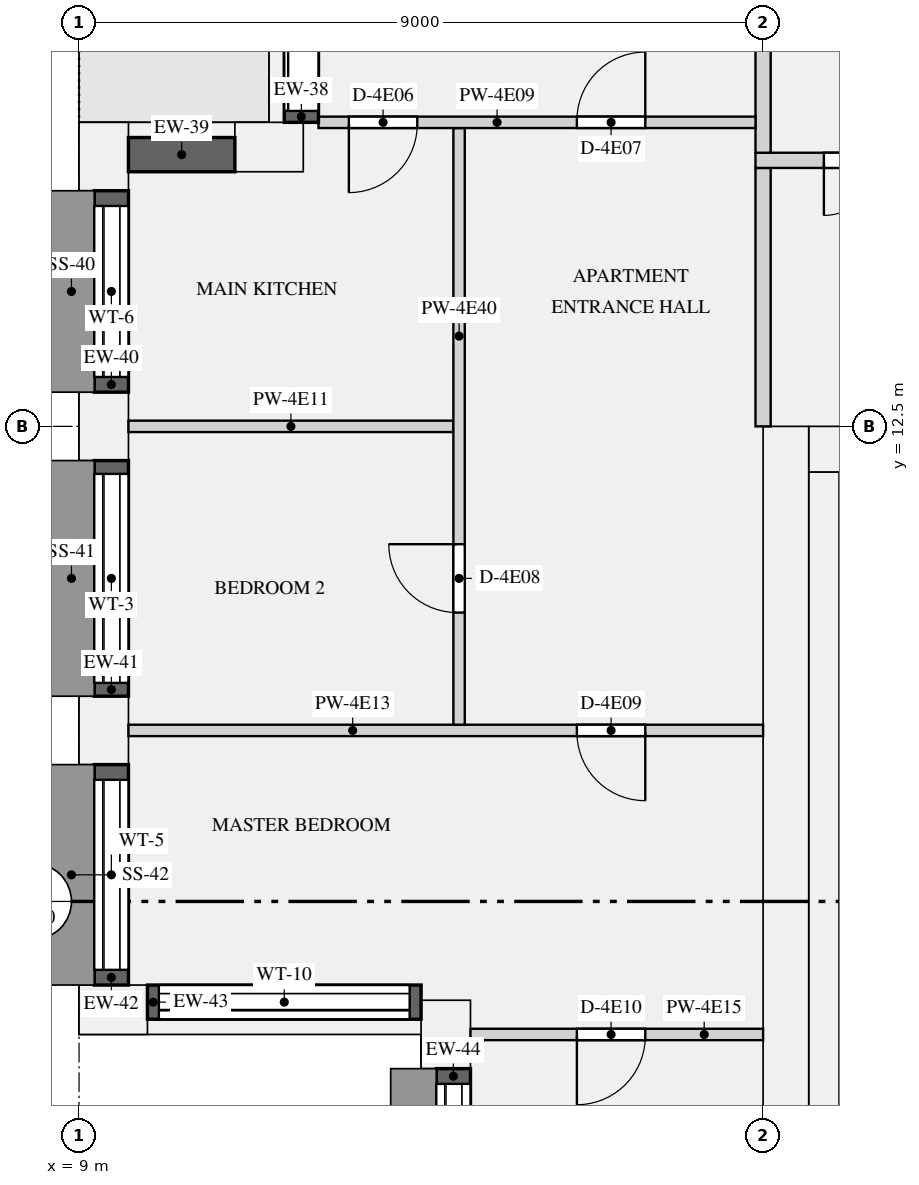
"""IFC4 building model, lengths in metres.
Left out: names, types, materials, properties, quantities, classifications, styles, units other than length and angle.
Written with IfcOpenShell. Run it as: python <this file> out.ifc"""

import sys

from ifc_helpers import new_model, si_unit, direction, frame, frame_2d, origin, origin_2d, place, context, subcontext, project, spatial, rectangle, extrude, element, fill, save


model = new_model("IFC4")
c1 = context("Model", 3, precision=1e-05, world=origin(), true_north=direction((0.0, 1.0)))
c2 = subcontext(c1, "Body", "Model", "MODEL_VIEW")
j1 = project(units=[si_unit("LENGTHUNIT", "METRE"), si_unit("PLANEANGLEUNIT", "RADIAN")], contexts=[c1])
p1 = place(None, origin())
s1 = spatial("IfcSite", under=j1, at=p1, CompositionType="ELEMENT")
p2 = place(p1, origin())
s2 = spatial("IfcBuilding", under=s1, at=p2, CompositionType="ELEMENT")
p3 = place(p2, frame((0.0, 0.0, 232.65)))
s3 = spatial("IfcBuildingStorey", under=s2, at=p3, CompositionType="ELEMENT", Elevation=232.65)
for number, where, z_axis, x_axis in (
    (1, (11.5, 16.175, 0.0), (0.0, 0.0, 1.0), (-1.0, 0.0, 0.0)),
    (2, (9.325, 16.05, 0.0), (0.0, 0.0, 1.0), (0.0, -1.0, 0.0)),
    (3, (9.325, 12.5, 0.0), (0.0, 0.0, 1.0), (0.0, -1.0, 0.0)),
    (4, (9.325, 8.5, 0.0), (0.0, 0.0, 1.0), (0.0, -1.0, 0.0)),
    (5, (9.45, 4.825, 0.0), (0.0, 0.0, 1.0), (1.0, 0.0, 0.0)),
    (6, (13.825, 4.5, 0.0), (0.0, 0.0, 1.0), (0.0, -1.0, 0.0)),
):
    element("IfcColumn", number, at=place(p3, frame(where, z_axis=z_axis, x_axis=x_axis)), inside=s3, PredefinedType="USERDEFINED", context=c2, shape_type="SweptSolid", body=[
        extrude(rectangle(XDim=0.9, YDim=0.65, at=origin_2d()), origin(), (0.0, 0.0, 1.0), 3.15),
    ])
p4 = place(p3, frame((18.3, 0.0, 0.0), z_axis=(0.0, 0.0, 1.0), x_axis=(0.0, 1.0, 0.0)))
e7 = element("IfcWall", 7, at=p4, inside=s3, PredefinedType="SHEAR", context=c2, shape_type="SweptSolid", body=[
    extrude(rectangle(XDim=12.5, YDim=0.6, at=frame_2d((6.25, 0.0))), origin(), (0.0, 0.0, 1.0), 3.15),
])
p5 = place(p3, frame((18.6, 12.2, 0.0), z_axis=(0.0, 0.0, 1.0), x_axis=(1.0, 0.0, 0.0)))
e8 = element("IfcWall", 8, at=p5, inside=s3, PredefinedType="SHEAR", context=c2, shape_type="SweptSolid", body=[
    extrude(rectangle(XDim=34.8, YDim=0.6, at=frame_2d((17.4, 0.0))), origin(), (0.0, 0.0, 1.0), 3.15),
])
p6 = place(p5, frame((24.575, 0.0, 0.0)))
e9 = element("IfcOpeningElement", 9, at=p6, cuts=e8, PredefinedType="OPENING", context=c2, shape_type="SweptSolid", body=[
    extrude(rectangle(XDim=1.1, YDim=2.1, at=frame_2d((0.55, 1.05))), frame((0.0, 0.31, 0.0), z_axis=(0.0, -1.0, 0.0), x_axis=(1.0, 0.0, 0.0)), (0.0, 0.0, 1.0), 0.62),
])
p7 = place(p5, frame((26.825, 0.0, 0.0)))
e10 = element("IfcOpeningElement", 10, at=p7, cuts=e8, PredefinedType="OPENING", context=c2, shape_type="SweptSolid", body=[
    extrude(rectangle(XDim=1.1, YDim=2.1, at=frame_2d((0.55, 1.05))), frame((0.0, 0.31, 0.0), z_axis=(0.0, -1.0, 0.0), x_axis=(1.0, 0.0, 0.0)), (0.0, 0.0, 1.0), 0.62),
])
p8 = place(p5, frame((29.075, 0.0, 0.0)))
e11 = element("IfcOpeningElement", 11, at=p8, cuts=e8, PredefinedType="OPENING", context=c2, shape_type="SweptSolid", body=[
    extrude(rectangle(XDim=1.1, YDim=2.1, at=frame_2d((0.55, 1.05))), frame((0.0, 0.31, 0.0), z_axis=(0.0, -1.0, 0.0), x_axis=(1.0, 0.0, 0.0)), (0.0, 0.0, 1.0), 0.62),
])
p9 = place(p5, frame((4.95, 0.0, 0.0)))
e12 = element("IfcOpeningElement", 12, at=p9, cuts=e8, PredefinedType="OPENING", context=c2, shape_type="SweptSolid", body=[
    extrude(rectangle(XDim=0.9, YDim=2.1, at=frame_2d((0.45, 1.05))), frame((0.0, 0.31, 0.0), z_axis=(0.0, -1.0, 0.0), x_axis=(1.0, 0.0, 0.0)), (0.0, 0.0, 1.0), 0.62),
])
p10 = place(p5, frame((11.95, 0.0, 0.0)))
e13 = element("IfcOpeningElement", 13, at=p10, cuts=e8, PredefinedType="OPENING", context=c2, shape_type="SweptSolid", body=[
    extrude(rectangle(XDim=0.9, YDim=2.1, at=frame_2d((0.45, 1.05))), frame((0.0, 0.31, 0.0), z_axis=(0.0, -1.0, 0.0), x_axis=(1.0, 0.0, 0.0)), (0.0, 0.0, 1.0), 0.62),
])
p11 = place(p5, frame((18.45, 0.0, 0.0)))
e14 = element("IfcOpeningElement", 14, at=p11, cuts=e8, PredefinedType="OPENING", context=c2, shape_type="SweptSolid", body=[
    extrude(rectangle(XDim=0.9, YDim=2.1, at=frame_2d((0.45, 1.05))), frame((0.0, 0.31, 0.0), z_axis=(0.0, -1.0, 0.0), x_axis=(1.0, 0.0, 0.0)), (0.0, 0.0, 1.0), 0.62),
])
p12 = place(p5, frame((1.55, 0.0, 0.0)))
e15 = element("IfcOpeningElement", 15, at=p12, cuts=e8, PredefinedType="OPENING", context=c2, shape_type="SweptSolid", body=[
    extrude(rectangle(XDim=1.2, YDim=2.1, at=frame_2d((0.6, 1.05))), frame((0.0, 0.31, 0.0), z_axis=(0.0, -1.0, 0.0), x_axis=(1.0, 0.0, 0.0)), (0.0, 0.0, 1.0), 0.62),
])
p13 = place(p5, frame((32.05, 0.0, 0.0)))
e16 = element("IfcOpeningElement", 16, at=p13, cuts=e8, PredefinedType="OPENING", context=c2, shape_type="SweptSolid", body=[
    extrude(rectangle(XDim=1.2, YDim=2.1, at=frame_2d((0.6, 1.05))), frame((0.0, 0.31, 0.0), z_axis=(0.0, -1.0, 0.0), x_axis=(1.0, 0.0, 0.0)), (0.0, 0.0, 1.0), 0.62),
])
p14 = place(p3, frame((18.8, 1.0, 0.0), z_axis=(0.0, 0.0, 1.0), x_axis=(0.0, 1.0, 0.0)))
e17 = element("IfcWall", 17, at=p14, inside=s3, PredefinedType="SHEAR", context=c2, shape_type="SweptSolid", body=[
    extrude(rectangle(XDim=10.9, YDim=0.4, at=frame_2d((5.45, 0.0))), origin(), (0.0, 0.0, 1.0), 3.15),
])
p15 = place(p3, frame((11.925, 20.05, 0.0), z_axis=(0.0, 0.0, 1.0), x_axis=(0.0, -1.0, 0.0)))
e18 = element("IfcWall", 18, at=p15, inside=s3, PredefinedType="SOLIDWALL", context=c2, shape_type="SweptSolid", body=[
    extrude(rectangle(XDim=3.55, YDim=0.45, at=frame_2d((1.775, 0.0))), origin(), (0.0, 0.0, 1.0), 2.8),
])
p16 = place(p15, frame((0.15, 0.0, 0.0)))
e19 = element("IfcOpeningElement", 19, at=p16, cuts=e18, PredefinedType="OPENING", context=c2, shape_type="SweptSolid", body=[
    extrude(rectangle(XDim=3.25, YDim=2.3, at=frame_2d((1.625, 1.15))), frame((0.0, 0.235, 0.0), z_axis=(0.0, -1.0, 0.0), x_axis=(1.0, 0.0, 0.0)), (0.0, 0.0, 1.0), 0.47),
])
p17 = place(p3, frame((11.05, 16.075, 0.9), z_axis=(0.0, 0.0, 1.0), x_axis=(-1.0, 0.0, 0.0)))
e20 = element("IfcWall", 20, at=p17, inside=s3, PredefinedType="SOLIDWALL", context=c2, shape_type="SweptSolid", body=[
    extrude(rectangle(XDim=1.4, YDim=0.45, at=frame_2d((0.7, 0.0))), origin(), (0.0, 0.0, 1.0), 1.9),
])
p18 = place(p3, frame((9.425, 15.6, 0.9), z_axis=(0.0, 0.0, 1.0), x_axis=(0.0, -1.0, 0.0)))
e21 = element("IfcWall", 21, at=p18, inside=s3, PredefinedType="SOLIDWALL", context=c2, shape_type="SweptSolid", body=[
    extrude(rectangle(XDim=2.65, YDim=0.45, at=frame_2d((1.325, 0.0))), origin(), (0.0, 0.0, 1.0), 1.9),
])
p19 = place(p18, frame((0.2, 0.0, 0.15)))
e22 = element("IfcOpeningElement", 22, at=p19, cuts=e21, PredefinedType="OPENING", context=c2, shape_type="SweptSolid", body=[
    extrude(rectangle(XDim=2.25, YDim=1.5, at=frame_2d((1.125, 0.75))), frame((0.0, 0.235, 0.0), z_axis=(0.0, -1.0, 0.0), x_axis=(1.0, 0.0, 0.0)), (0.0, 0.0, 1.0), 0.47),
])
p20 = place(p3, frame((9.425, 12.05, 0.9), z_axis=(0.0, 0.0, 1.0), x_axis=(0.0, -1.0, 0.0)))
e23 = element("IfcWall", 23, at=p20, inside=s3, PredefinedType="SOLIDWALL", context=c2, shape_type="SweptSolid", body=[
    extrude(rectangle(XDim=3.1, YDim=0.45, at=frame_2d((1.55, 0.0))), origin(), (0.0, 0.0, 1.0), 1.9),
])
p21 = place(p20, frame((0.175, 0.0, 0.15)))
e24 = element("IfcOpeningElement", 24, at=p21, cuts=e23, PredefinedType="OPENING", context=c2, shape_type="SweptSolid", body=[
    extrude(rectangle(XDim=2.75, YDim=1.5, at=frame_2d((1.375, 0.75))), frame((0.0, 0.235, 0.0), z_axis=(0.0, -1.0, 0.0), x_axis=(1.0, 0.0, 0.0)), (0.0, 0.0, 1.0), 0.47),
])
p22 = place(p3, frame((9.425, 8.05, 0.9), z_axis=(0.0, 0.0, 1.0), x_axis=(0.0, -1.0, 0.0)))
e25 = element("IfcWall", 25, at=p22, inside=s3, PredefinedType="SOLIDWALL", context=c2, shape_type="SweptSolid", body=[
    extrude(rectangle(XDim=2.9, YDim=0.45, at=frame_2d((1.45, 0.0))), origin(), (0.0, 0.0, 1.0), 1.9),
])
p23 = place(p22, frame((0.2, 0.0, 0.15)))
e26 = element("IfcOpeningElement", 26, at=p23, cuts=e25, PredefinedType="OPENING", context=c2, shape_type="SweptSolid", body=[
    extrude(rectangle(XDim=2.5, YDim=1.5, at=frame_2d((1.25, 0.75))), frame((0.0, 0.235, 0.0), z_axis=(0.0, -1.0, 0.0), x_axis=(1.0, 0.0, 0.0)), (0.0, 0.0, 1.0), 0.47),
])
p24 = place(p3, frame((9.9, 4.925, 0.9), z_axis=(0.0, 0.0, 1.0), x_axis=(1.0, 0.0, 0.0)))
e27 = element("IfcWall", 27, at=p24, inside=s3, PredefinedType="SOLIDWALL", context=c2, shape_type="SweptSolid", body=[
    extrude(rectangle(XDim=3.6, YDim=0.45, at=frame_2d((1.8, 0.0))), origin(), (0.0, 0.0, 1.0), 1.9),
])
p25 = place(p24, frame((0.15, 0.0, 0.15)))
e28 = element("IfcOpeningElement", 28, at=p25, cuts=e27, PredefinedType="OPENING", context=c2, shape_type="SweptSolid", body=[
    extrude(rectangle(XDim=3.3, YDim=1.5, at=frame_2d((1.65, 0.75))), frame((0.0, 0.235, 0.0), z_axis=(0.0, -1.0, 0.0), x_axis=(1.0, 0.0, 0.0)), (0.0, 0.0, 1.0), 0.47),
])
p26 = place(p3, frame((13.925, 4.05, 0.9), z_axis=(0.0, 0.0, 1.0), x_axis=(0.0, -1.0, 0.0)))
e29 = element("IfcWall", 29, at=p26, inside=s3, PredefinedType="SOLIDWALL", context=c2, shape_type="SweptSolid", body=[
    extrude(rectangle(XDim=3.4, YDim=0.45, at=frame_2d((1.7, 0.0))), origin(), (0.0, 0.0, 1.0), 1.9),
])
p27 = place(p26, frame((0.2, 0.0, 0.15)))
e30 = element("IfcOpeningElement", 30, at=p27, cuts=e29, PredefinedType="OPENING", context=c2, shape_type="SweptSolid", body=[
    extrude(rectangle(XDim=3.0, YDim=1.5, at=frame_2d((1.5, 0.75))), frame((0.0, 0.235, 0.0), z_axis=(0.0, -1.0, 0.0), x_axis=(1.0, 0.0, 0.0)), (0.0, 0.0, 1.0), 0.47),
])
p28 = place(p3, frame((18.0, 12.5, 0.0), z_axis=(0.0, 0.0, 1.0), x_axis=(0.0, 1.0, 0.0)))
e31 = element("IfcWall", 31, at=p28, inside=s3, PredefinedType="PARTITIONING", context=c2, shape_type="SweptSolid", body=[
    extrude(rectangle(XDim=3.4, YDim=0.2, at=frame_2d((1.7, 0.0))), origin(), (0.0, 0.0, 1.0), 2.8),
])
p29 = place(p3, frame((12.15, 16.5, 0.0), z_axis=(0.0, 0.0, 1.0), x_axis=(1.0, 0.0, 0.0)))
e32 = element("IfcWall", 32, at=p29, inside=s3, PredefinedType="PARTITIONING", context=c2, shape_type="SweptSolid", body=[
    extrude(rectangle(XDim=5.75, YDim=0.15, at=frame_2d((2.875, 0.0))), origin(), (0.0, 0.0, 1.0), 2.8),
])
p30 = place(p29, frame((0.4, 0.0, 0.0)))
e33 = element("IfcOpeningElement", 33, at=p30, cuts=e32, PredefinedType="OPENING", context=c2, shape_type="SweptSolid", body=[
    extrude(rectangle(XDim=0.9, YDim=2.1, at=frame_2d((0.45, 1.05))), frame((0.0, 0.085, 0.0), z_axis=(0.0, -1.0, 0.0), x_axis=(1.0, 0.0, 0.0)), (0.0, 0.0, 1.0), 0.17),
])
p31 = place(p29, frame((3.4, 0.0, 0.0)))
e34 = element("IfcOpeningElement", 34, at=p31, cuts=e32, PredefinedType="OPENING", context=c2, shape_type="SweptSolid", body=[
    extrude(rectangle(XDim=0.9, YDim=2.1, at=frame_2d((0.45, 1.05))), frame((0.0, 0.085, 0.0), z_axis=(0.0, -1.0, 0.0), x_axis=(1.0, 0.0, 0.0)), (0.0, 0.0, 1.0), 0.17),
])
p32 = place(p3, frame((9.65, 12.5, 0.0), z_axis=(0.0, 0.0, 1.0), x_axis=(1.0, 0.0, 0.0)))
e35 = element("IfcWall", 35, at=p32, inside=s3, PredefinedType="PARTITIONING", context=c2, shape_type="SweptSolid", body=[
    extrude(rectangle(XDim=4.275, YDim=0.15, at=frame_2d((2.138, 0.0))), origin(), (0.0, 0.0, 1.0), 2.8),
])
p33 = place(p3, frame((9.65, 8.5, 0.0), z_axis=(0.0, 0.0, 1.0), x_axis=(1.0, 0.0, 0.0)))
e36 = element("IfcWall", 36, at=p33, inside=s3, PredefinedType="PARTITIONING", context=c2, shape_type="SweptSolid", body=[
    extrude(rectangle(XDim=8.35, YDim=0.15, at=frame_2d((4.175, 0.0))), origin(), (0.0, 0.0, 1.0), 2.8),
])
p34 = place(p33, frame((5.9, 0.0, 0.0)))
e37 = element("IfcOpeningElement", 37, at=p34, cuts=e36, PredefinedType="OPENING", context=c2, shape_type="SweptSolid", body=[
    extrude(rectangle(XDim=0.9, YDim=2.1, at=frame_2d((0.45, 1.05))), frame((0.0, 0.085, 0.0), z_axis=(0.0, -1.0, 0.0), x_axis=(1.0, 0.0, 0.0)), (0.0, 0.0, 1.0), 0.17),
])
p35 = place(p3, frame((14.15, 4.5, 0.0), z_axis=(0.0, 0.0, 1.0), x_axis=(1.0, 0.0, 0.0)))
e38 = element("IfcWall", 38, at=p35, inside=s3, PredefinedType="PARTITIONING", context=c2, shape_type="SweptSolid", body=[
    extrude(rectangle(XDim=3.85, YDim=0.15, at=frame_2d((1.925, 0.0))), origin(), (0.0, 0.0, 1.0), 2.8),
])
p36 = place(p35, frame((1.4, 0.0, 0.0)))
e39 = element("IfcOpeningElement", 39, at=p36, cuts=e38, PredefinedType="OPENING", context=c2, shape_type="SweptSolid", body=[
    extrude(rectangle(XDim=0.9, YDim=2.1, at=frame_2d((0.45, 1.05))), frame((0.0, 0.085, 0.0), z_axis=(0.0, -1.0, 0.0), x_axis=(1.0, 0.0, 0.0)), (0.0, 0.0, 1.0), 0.17),
])
p37 = place(p3, frame((17.9, 16.0, 0.0), z_axis=(0.0, 0.0, 1.0), x_axis=(1.0, 0.0, 0.0)))
e40 = element("IfcWall", 40, at=p37, inside=s3, PredefinedType="PARTITIONING", context=c2, shape_type="SweptSolid", body=[
    extrude(rectangle(XDim=36.2, YDim=0.2, at=frame_2d((18.1, 0.0))), origin(), (0.0, 0.0, 1.0), 2.8),
])
p38 = place(p37, frame((0.9, 0.0, 0.0)))
e41 = element("IfcOpeningElement", 41, at=p38, cuts=e40, PredefinedType="OPENING", context=c2, shape_type="SweptSolid", body=[
    extrude(rectangle(XDim=1.4, YDim=2.1, at=frame_2d((0.7, 1.05))), frame((0.0, 0.11, 0.0), z_axis=(0.0, -1.0, 0.0), x_axis=(1.0, 0.0, 0.0)), (0.0, 0.0, 1.0), 0.22),
])
p39 = place(p37, frame((33.9, 0.0, 0.0)))
e42 = element("IfcOpeningElement", 42, at=p39, cuts=e40, PredefinedType="OPENING", context=c2, shape_type="SweptSolid", body=[
    extrude(rectangle(XDim=1.4, YDim=2.1, at=frame_2d((0.7, 1.05))), frame((0.0, 0.11, 0.0), z_axis=(0.0, -1.0, 0.0), x_axis=(1.0, 0.0, 0.0)), (0.0, 0.0, 1.0), 0.22),
])
p40 = place(p3, frame((18.0, 16.1, 0.0), z_axis=(0.0, 0.0, 1.0), x_axis=(0.0, 1.0, 0.0)))
e43 = element("IfcWall", 43, at=p40, inside=s3, PredefinedType="PARTITIONING", context=c2, shape_type="SweptSolid", body=[
    extrude(rectangle(XDim=7.8, YDim=0.2, at=frame_2d((3.9, 0.0))), origin(), (0.0, 0.0, 1.0), 2.8),
])
p41 = place(p40, frame((5.35, 0.0, 0.0)))
e44 = element("IfcOpeningElement", 44, at=p41, cuts=e43, PredefinedType="OPENING", context=c2, shape_type="SweptSolid", body=[
    extrude(rectangle(XDim=1.1, YDim=2.1, at=frame_2d((0.55, 1.05))), frame((0.0, 0.11, 0.0), z_axis=(0.0, -1.0, 0.0), x_axis=(1.0, 0.0, 0.0)), (0.0, 0.0, 1.0), 0.22),
])
p42 = place(p3, frame((14.0, 8.575, 0.0), z_axis=(0.0, 0.0, 1.0), x_axis=(0.0, 1.0, 0.0)))
e45 = element("IfcWall", 45, at=p42, inside=s3, PredefinedType="PARTITIONING", context=c2, shape_type="SweptSolid", body=[
    extrude(rectangle(XDim=7.85, YDim=0.15, at=frame_2d((3.925, 0.0))), origin(), (0.0, 0.0, 1.0), 2.8),
])
p43 = place(p42, frame((1.475, 0.0, 0.0)))
e46 = element("IfcOpeningElement", 46, at=p43, cuts=e45, PredefinedType="OPENING", context=c2, shape_type="SweptSolid", body=[
    extrude(rectangle(XDim=0.9, YDim=2.1, at=frame_2d((0.45, 1.05))), frame((0.0, 0.085, 0.0), z_axis=(0.0, -1.0, 0.0), x_axis=(1.0, 0.0, 0.0)), (0.0, 0.0, 1.0), 0.17),
])
p44 = place(p16, origin())
e47 = element("IfcDoor", 47, at=p44, inside=s3, OperationType="SLIDING_TO_LEFT", PredefinedType="DOOR", context=c2, shape_type="SweptSolid", body=[
    extrude(rectangle(XDim=3.25, YDim=2.3, at=frame_2d((1.625, 1.15))), frame((0.0, -0.07, 0.0), z_axis=(0.0, -1.0, 0.0), x_axis=(1.0, 0.0, 0.0)), (0.0, 0.0, 1.0), 0.05),
])
fill(e19, e47)
p45 = place(p19, origin())
e48 = element("IfcWindow", 48, at=p45, inside=s3, PartitioningType="SINGLE_PANEL", PredefinedType="WINDOW", context=c2, shape_type="SweptSolid", body=[
    extrude(rectangle(XDim=2.25, YDim=1.5, at=frame_2d((1.125, 0.75))), frame((0.0, -0.065, 0.0), z_axis=(0.0, -1.0, 0.0), x_axis=(1.0, 0.0, 0.0)), (0.0, 0.0, 1.0), 0.06),
])
fill(e22, e48)
p46 = place(p21, origin())
e49 = element("IfcWindow", 49, at=p46, inside=s3, PartitioningType="SINGLE_PANEL", PredefinedType="WINDOW", context=c2, shape_type="SweptSolid", body=[
    extrude(rectangle(XDim=2.75, YDim=1.5, at=frame_2d((1.375, 0.75))), frame((0.0, -0.065, 0.0), z_axis=(0.0, -1.0, 0.0), x_axis=(1.0, 0.0, 0.0)), (0.0, 0.0, 1.0), 0.06),
])
fill(e24, e49)
p47 = place(p23, origin())
e50 = element("IfcWindow", 50, at=p47, inside=s3, PartitioningType="SINGLE_PANEL", PredefinedType="WINDOW", context=c2, shape_type="SweptSolid", body=[
    extrude(rectangle(XDim=2.5, YDim=1.5, at=frame_2d((1.25, 0.75))), frame((0.0, -0.065, 0.0), z_axis=(0.0, -1.0, 0.0), x_axis=(1.0, 0.0, 0.0)), (0.0, 0.0, 1.0), 0.06),
])
fill(e26, e50)
p48 = place(p25, origin())
e51 = element("IfcWindow", 51, at=p48, inside=s3, PartitioningType="SINGLE_PANEL", PredefinedType="WINDOW", context=c2, shape_type="SweptSolid", body=[
    extrude(rectangle(XDim=3.3, YDim=1.5, at=frame_2d((1.65, 0.75))), frame((0.0, -0.065, 0.0), z_axis=(0.0, -1.0, 0.0), x_axis=(1.0, 0.0, 0.0)), (0.0, 0.0, 1.0), 0.06),
])
fill(e28, e51)
p49 = place(p27, origin())
e52 = element("IfcWindow", 52, at=p49, inside=s3, PartitioningType="SINGLE_PANEL", PredefinedType="WINDOW", context=c2, shape_type="SweptSolid", body=[
    extrude(rectangle(XDim=3.0, YDim=1.5, at=frame_2d((1.5, 0.75))), frame((0.0, -0.065, 0.0), z_axis=(0.0, -1.0, 0.0), x_axis=(1.0, 0.0, 0.0)), (0.0, 0.0, 1.0), 0.06),
])
fill(e30, e52)
p50 = place(p38, frame((1.4, 0.0, 0.0), z_axis=(0.0, 0.0, 1.0), x_axis=(-1.0, 0.0, 0.0)))
e53 = element("IfcDoor", 53, at=p50, inside=s3, OperationType="DOUBLE_DOOR_SINGLE_SWING", PredefinedType="DOOR", context=c2, shape_type="SweptSolid", body=[
    extrude(rectangle(XDim=1.4, YDim=2.1, at=frame_2d((0.7, 1.05))), frame((0.0, 0.025, 0.0), z_axis=(0.0, -1.0, 0.0), x_axis=(1.0, 0.0, 0.0)), (0.0, 0.0, 1.0), 0.05),
])
fill(e41, e53)
p51 = place(p30, frame((0.9, 0.0, 0.0), z_axis=(0.0, 0.0, 1.0), x_axis=(-1.0, 0.0, 0.0)))
e54 = element("IfcDoor", 54, at=p51, inside=s3, OperationType="SINGLE_SWING_RIGHT", PredefinedType="DOOR", context=c2, shape_type="SweptSolid", body=[
    extrude(rectangle(XDim=0.9, YDim=2.1, at=frame_2d((0.45, 1.05))), frame((0.0, 0.025, 0.0), z_axis=(0.0, -1.0, 0.0), x_axis=(1.0, 0.0, 0.0)), (0.0, 0.0, 1.0), 0.05),
])
fill(e33, e54)
p52 = place(p31, origin())
e55 = element("IfcDoor", 55, at=p52, inside=s3, OperationType="SINGLE_SWING_RIGHT", PredefinedType="DOOR", context=c2, shape_type="SweptSolid", body=[
    extrude(rectangle(XDim=0.9, YDim=2.1, at=frame_2d((0.45, 1.05))), frame((0.0, 0.025, 0.0), z_axis=(0.0, -1.0, 0.0), x_axis=(1.0, 0.0, 0.0)), (0.0, 0.0, 1.0), 0.05),
])
fill(e34, e55)
p53 = place(p43, origin())
e56 = element("IfcDoor", 56, at=p53, inside=s3, OperationType="SINGLE_SWING_RIGHT", PredefinedType="DOOR", context=c2, shape_type="SweptSolid", body=[
    extrude(rectangle(XDim=0.9, YDim=2.1, at=frame_2d((0.45, 1.05))), frame((0.0, 0.025, 0.0), z_axis=(0.0, -1.0, 0.0), x_axis=(1.0, 0.0, 0.0)), (0.0, 0.0, 1.0), 0.05),
])
fill(e46, e56)
p54 = place(p34, frame((0.9, 0.0, 0.0), z_axis=(0.0, 0.0, 1.0), x_axis=(-1.0, 0.0, 0.0)))
e57 = element("IfcDoor", 57, at=p54, inside=s3, OperationType="SINGLE_SWING_LEFT", PredefinedType="DOOR", context=c2, shape_type="SweptSolid", body=[
    extrude(rectangle(XDim=0.9, YDim=2.1, at=frame_2d((0.45, 1.05))), frame((0.0, 0.025, 0.0), z_axis=(0.0, -1.0, 0.0), x_axis=(1.0, 0.0, 0.0)), (0.0, 0.0, 1.0), 0.05),
])
fill(e37, e57)
p55 = place(p36, frame((0.9, 0.0, 0.0), z_axis=(0.0, 0.0, 1.0), x_axis=(-1.0, 0.0, 0.0)))
e58 = element("IfcDoor", 58, at=p55, inside=s3, OperationType="SINGLE_SWING_RIGHT", PredefinedType="DOOR", context=c2, shape_type="SweptSolid", body=[
    extrude(rectangle(XDim=0.9, YDim=2.1, at=frame_2d((0.45, 1.05))), frame((0.0, 0.025, 0.0), z_axis=(0.0, -1.0, 0.0), x_axis=(1.0, 0.0, 0.0)), (0.0, 0.0, 1.0), 0.05),
])
fill(e39, e58)
save(model, sys.argv[1])
